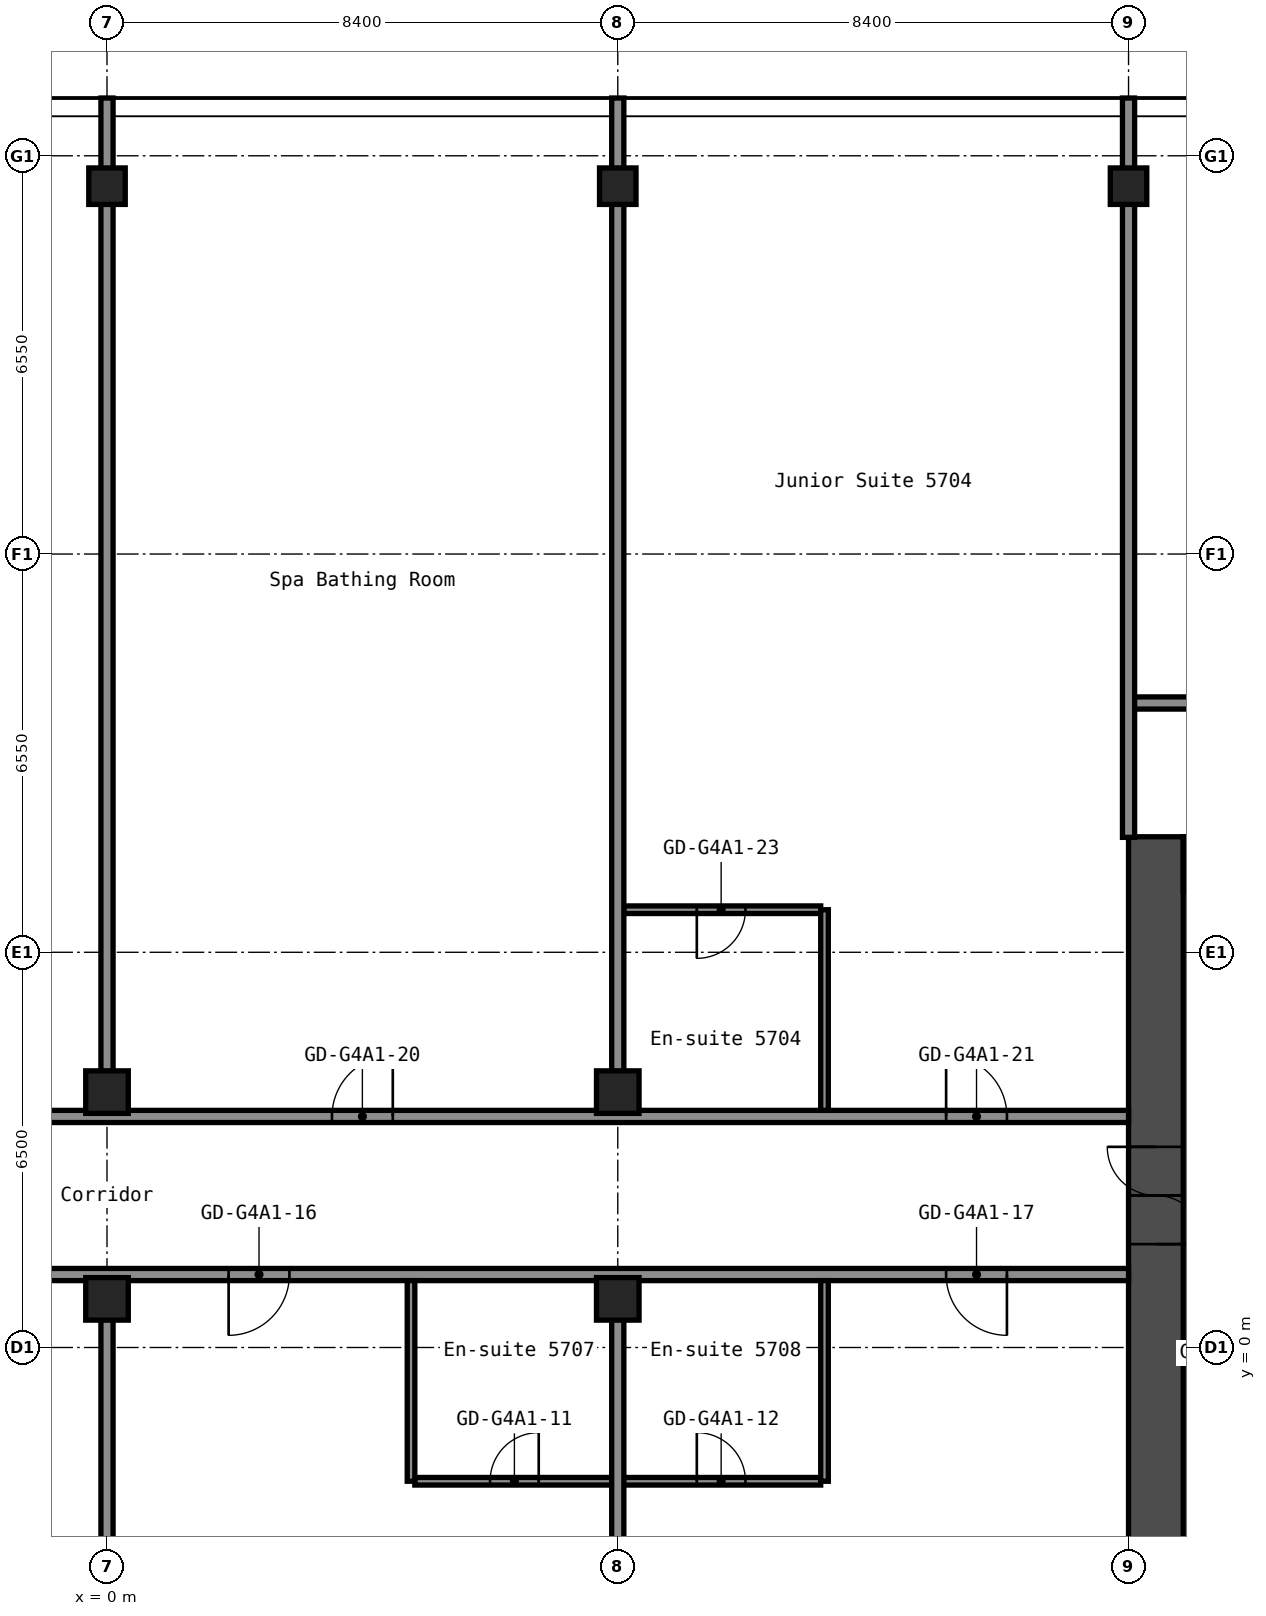
"""IFC4 building model, lengths in metres.
Left out: names, types, materials, properties, quantities, classifications, styles, units other than length and angle.
Written with IfcOpenShell. Run it as: python <this file> out.ifc"""

import sys

from ifc_helpers import new_model, si_unit, direction, frame, frame_2d, origin, origin_2d, place, context, subcontext, project, spatial, rectangle, hollow_rectangle, extrude, element, fill, save


model = new_model("IFC4")
c1 = context("Model", 3, precision=1e-05, world=origin(), true_north=direction((0.0, 1.0)))
c2 = subcontext(c1, "Body", "Model", "MODEL_VIEW")
j1 = project(units=[si_unit("LENGTHUNIT", "METRE"), si_unit("PLANEANGLEUNIT", "RADIAN")], contexts=[c1])
p1 = place(None, origin())
s1 = spatial("IfcSite", under=j1, at=p1, CompositionType="ELEMENT")
p2 = place(p1, origin())
s2 = spatial("IfcBuilding", under=s1, at=p2, CompositionType="ELEMENT")
p3 = place(p2, frame((0.0, 0.0, 202.6)))
s3 = spatial("IfcBuildingStorey", under=s2, at=p3, CompositionType="ELEMENT", Elevation=202.6)
for number, where, z_axis, x_axis in (
    (1, (0.0, 0.8, 0.0), (0.0, 0.0, 1.0), (1.0, 0.0, 0.0)),
    (2, (0.0, 4.2, 0.0), (0.0, 0.0, 1.0), (1.0, 0.0, 0.0)),
):
    element("IfcColumn", number, at=place(p3, frame(where, z_axis=z_axis, x_axis=x_axis)), inside=s3, PredefinedType="COLUMN", context=c2, shape_type="SweptSolid", body=[
        extrude(hollow_rectangle(XDim=0.7, YDim=0.7, WallThickness=0.028, at=origin_2d()), origin(), (0.0, 0.0, 1.0), 2.75),
    ])
p4 = place(p3, frame((0.0, 19.1, 0.0), z_axis=(0.0, 0.0, 1.0), x_axis=(1.0, 0.0, 0.0)))
e3 = element("IfcColumn", 3, at=p4, inside=s3, PredefinedType="COLUMN", context=c2, shape_type="SweptSolid", body=[
    extrude(hollow_rectangle(XDim=0.6, YDim=0.6, WallThickness=0.025, InnerFilletRadius=0.038, OuterFilletRadius=0.062, at=origin_2d()), origin(), (0.0, 0.0, 1.0), 2.75),
])
for number, where, z_axis, x_axis in (
    (4, (8.4, 0.8, 0.0), (0.0, 0.0, 1.0), (1.0, 0.0, 0.0)),
    (5, (8.4, 4.2, 0.0), (0.0, 0.0, 1.0), (1.0, 0.0, 0.0)),
):
    element("IfcColumn", number, at=place(p3, frame(where, z_axis=z_axis, x_axis=x_axis)), inside=s3, PredefinedType="COLUMN", context=c2, shape_type="SweptSolid", body=[
        extrude(hollow_rectangle(XDim=0.7, YDim=0.7, WallThickness=0.028, at=origin_2d()), origin(), (0.0, 0.0, 1.0), 2.75),
    ])
for number, where, z_axis, x_axis in (
    (6, (8.4, 19.1, 0.0), (0.0, 0.0, 1.0), (1.0, 0.0, 0.0)),
    (7, (16.8, 19.1, 0.0), (0.0, 0.0, 1.0), (1.0, 0.0, 0.0)),
):
    element("IfcColumn", number, at=place(p3, frame(where, z_axis=z_axis, x_axis=x_axis)), inside=s3, PredefinedType="COLUMN", context=c2, shape_type="SweptSolid", body=[
        extrude(hollow_rectangle(XDim=0.6, YDim=0.6, WallThickness=0.025, InnerFilletRadius=0.038, OuterFilletRadius=0.062, at=origin_2d()), origin(), (0.0, 0.0, 1.0), 2.75),
    ])
p5 = place(p3, frame((17.25, -8.4, 0.0), z_axis=(0.0, 0.0, 1.0), x_axis=(0.0, 1.0, 0.0)))
e8 = element("IfcWall", 8, at=p5, inside=s3, PredefinedType="SHEAR", context=c2, shape_type="SweptSolid", body=[
    extrude(rectangle(XDim=16.8, YDim=0.9, at=frame_2d((8.4, 0.0))), origin(), (0.0, 0.0, 1.0), 2.75),
])
p6 = place(p5, frame((10.1, 0.0, 0.0)))
e9 = element("IfcOpeningElement", 9, at=p6, cuts=e8, PredefinedType="OPENING", context=c2, shape_type="SweptSolid", body=[
    extrude(rectangle(XDim=1.6, YDim=2.1, at=frame_2d((0.8, 1.05))), frame((0.0, 0.46, 0.0), z_axis=(0.0, -1.0, 0.0), x_axis=(1.0, 0.0, 0.0)), (0.0, 0.0, 1.0), 0.92),
])
p7 = place(p3, frame((17.7, 7.95, 0.0), z_axis=(0.0, 0.0, 1.0), x_axis=(1.0, 0.0, 0.0)))
e10 = element("IfcWall", 10, at=p7, inside=s3, PredefinedType="SHEAR", context=c2, shape_type="SweptSolid", body=[
    extrude(rectangle(XDim=15.0, YDim=0.9, at=frame_2d((7.5, 0.0))), origin(), (0.0, 0.0, 1.0), 2.75),
])
p8 = place(p7, frame((10.4, 0.0, 0.0)))
e11 = element("IfcOpeningElement", 11, at=p8, cuts=e10, PredefinedType="OPENING", context=c2, shape_type="SweptSolid", body=[
    extrude(rectangle(XDim=1.2, YDim=2.1, at=frame_2d((0.6, 1.05))), frame((0.0, 0.46, 0.0), z_axis=(0.0, -1.0, 0.0), x_axis=(1.0, 0.0, 0.0)), (0.0, 0.0, 1.0), 0.92),
])
p9 = place(p7, frame((13.35, 0.0, 0.0)))
e12 = element("IfcOpeningElement", 12, at=p9, cuts=e10, PredefinedType="OPENING", context=c2, shape_type="SweptSolid", body=[
    extrude(rectangle(XDim=0.9, YDim=2.1, at=frame_2d((0.45, 1.05))), frame((0.0, 0.46, 0.0), z_axis=(0.0, -1.0, 0.0), x_axis=(1.0, 0.0, 0.0)), (0.0, 0.0, 1.0), 0.92),
])
p10 = place(p3, frame((5.062, -2.2, 0.0), z_axis=(0.0, 0.0, 1.0), x_axis=(1.0, 0.0, 0.0)))
e13 = element("IfcWall", 13, at=p10, inside=s3, PredefinedType="PARTITIONING", context=c2, shape_type="SweptSolid", body=[
    extrude(rectangle(XDim=6.675, YDim=0.125, at=frame_2d((3.337, 0.0))), origin(), (0.0, 0.0, 1.0), 2.75),
])
p11 = place(p10, frame((1.238, 0.0, 0.0)))
e14 = element("IfcOpeningElement", 14, at=p11, cuts=e13, PredefinedType="OPENING", context=c2, shape_type="SweptSolid", body=[
    extrude(rectangle(XDim=0.8, YDim=2.1, at=frame_2d((0.4, 1.05))), frame((0.0, 0.073, 0.0), z_axis=(0.0, -1.0, 0.0), x_axis=(1.0, 0.0, 0.0)), (0.0, 0.0, 1.0), 0.145),
])
p12 = place(p10, frame((4.637, 0.0, 0.0)))
e15 = element("IfcOpeningElement", 15, at=p12, cuts=e13, PredefinedType="OPENING", context=c2, shape_type="SweptSolid", body=[
    extrude(rectangle(XDim=0.8, YDim=2.1, at=frame_2d((0.4, 1.05))), frame((0.0, 0.073, 0.0), z_axis=(0.0, -1.0, 0.0), x_axis=(1.0, 0.0, 0.0)), (0.0, 0.0, 1.0), 0.145),
])
p13 = place(p3, frame((-16.8, 1.2, 0.0), z_axis=(0.0, 0.0, 1.0), x_axis=(1.0, 0.0, 0.0)))
e16 = element("IfcWall", 16, at=p13, inside=s3, PredefinedType="PARTITIONING", context=c2, shape_type="SweptSolid", body=[
    extrude(rectangle(XDim=33.6, YDim=0.2, at=frame_2d((16.8, 0.0))), origin(), (0.0, 0.0, 1.0), 2.75),
])
p14 = place(p13, frame((2.0, 0.0, 0.0)))
e17 = element("IfcOpeningElement", 17, at=p14, cuts=e16, PredefinedType="OPENING", context=c2, shape_type="SweptSolid", body=[
    extrude(rectangle(XDim=1.0, YDim=2.1, at=frame_2d((0.5, 1.05))), frame((0.0, 0.11, 0.0), z_axis=(0.0, -1.0, 0.0), x_axis=(1.0, 0.0, 0.0)), (0.0, 0.0, 1.0), 0.22),
])
p15 = place(p13, frame((9.8, 0.0, 0.0)))
e18 = element("IfcOpeningElement", 18, at=p15, cuts=e16, PredefinedType="OPENING", context=c2, shape_type="SweptSolid", body=[
    extrude(rectangle(XDim=0.9, YDim=2.1, at=frame_2d((0.45, 1.05))), frame((0.0, 0.11, 0.0), z_axis=(0.0, -1.0, 0.0), x_axis=(1.0, 0.0, 0.0)), (0.0, 0.0, 1.0), 0.22),
])
p16 = place(p13, frame((14.0, 0.0, 0.0)))
e19 = element("IfcOpeningElement", 19, at=p16, cuts=e16, PredefinedType="OPENING", context=c2, shape_type="SweptSolid", body=[
    extrude(rectangle(XDim=0.9, YDim=2.1, at=frame_2d((0.45, 1.05))), frame((0.0, 0.11, 0.0), z_axis=(0.0, -1.0, 0.0), x_axis=(1.0, 0.0, 0.0)), (0.0, 0.0, 1.0), 0.22),
])
p17 = place(p13, frame((18.8, 0.0, 0.0)))
e20 = element("IfcOpeningElement", 20, at=p17, cuts=e16, PredefinedType="OPENING", context=c2, shape_type="SweptSolid", body=[
    extrude(rectangle(XDim=1.0, YDim=2.1, at=frame_2d((0.5, 1.05))), frame((0.0, 0.11, 0.0), z_axis=(0.0, -1.0, 0.0), x_axis=(1.0, 0.0, 0.0)), (0.0, 0.0, 1.0), 0.22),
])
p18 = place(p13, frame((30.6, 0.0, 0.0)))
e21 = element("IfcOpeningElement", 21, at=p18, cuts=e16, PredefinedType="OPENING", context=c2, shape_type="SweptSolid", body=[
    extrude(rectangle(XDim=1.0, YDim=2.1, at=frame_2d((0.5, 1.05))), frame((0.0, 0.11, 0.0), z_axis=(0.0, -1.0, 0.0), x_axis=(1.0, 0.0, 0.0)), (0.0, 0.0, 1.0), 0.22),
])
p19 = place(p3, frame((-16.8, 3.8, 0.0), z_axis=(0.0, 0.0, 1.0), x_axis=(1.0, 0.0, 0.0)))
e22 = element("IfcWall", 22, at=p19, inside=s3, PredefinedType="PARTITIONING", context=c2, shape_type="SweptSolid", body=[
    extrude(rectangle(XDim=33.6, YDim=0.2, at=frame_2d((16.8, 0.0))), origin(), (0.0, 0.0, 1.0), 2.75),
])
p20 = place(p19, frame((5.4, 0.0, 0.0)))
e23 = element("IfcOpeningElement", 23, at=p20, cuts=e22, PredefinedType="OPENING", context=c2, shape_type="SweptSolid", body=[
    extrude(rectangle(XDim=1.0, YDim=2.1, at=frame_2d((0.5, 1.05))), frame((0.0, 0.11, 0.0), z_axis=(0.0, -1.0, 0.0), x_axis=(1.0, 0.0, 0.0)), (0.0, 0.0, 1.0), 0.22),
])
p21 = place(p19, frame((12.1, 0.0, 0.0)))
e24 = element("IfcOpeningElement", 24, at=p21, cuts=e22, PredefinedType="OPENING", context=c2, shape_type="SweptSolid", body=[
    extrude(rectangle(XDim=1.0, YDim=2.1, at=frame_2d((0.5, 1.05))), frame((0.0, 0.11, 0.0), z_axis=(0.0, -1.0, 0.0), x_axis=(1.0, 0.0, 0.0)), (0.0, 0.0, 1.0), 0.22),
])
p22 = place(p19, frame((20.5, 0.0, 0.0)))
e25 = element("IfcOpeningElement", 25, at=p22, cuts=e22, PredefinedType="OPENING", context=c2, shape_type="SweptSolid", body=[
    extrude(rectangle(XDim=1.0, YDim=2.1, at=frame_2d((0.5, 1.05))), frame((0.0, 0.11, 0.0), z_axis=(0.0, -1.0, 0.0), x_axis=(1.0, 0.0, 0.0)), (0.0, 0.0, 1.0), 0.22),
])
p23 = place(p19, frame((30.6, 0.0, 0.0)))
e26 = element("IfcOpeningElement", 26, at=p23, cuts=e22, PredefinedType="OPENING", context=c2, shape_type="SweptSolid", body=[
    extrude(rectangle(XDim=1.0, YDim=2.1, at=frame_2d((0.5, 1.05))), frame((0.0, 0.11, 0.0), z_axis=(0.0, -1.0, 0.0), x_axis=(1.0, 0.0, 0.0)), (0.0, 0.0, 1.0), 0.22),
])
p24 = place(p3, frame((8.5, 7.2, 0.0), z_axis=(0.0, 0.0, 1.0), x_axis=(1.0, 0.0, 0.0)))
e27 = element("IfcWall", 27, at=p24, inside=s3, PredefinedType="PARTITIONING", context=c2, shape_type="SweptSolid", body=[
    extrude(rectangle(XDim=3.238, YDim=0.125, at=frame_2d((1.619, 0.0))), origin(), (0.0, 0.0, 1.0), 2.75),
])
p25 = place(p24, frame((1.2, 0.0, 0.0)))
e28 = element("IfcOpeningElement", 28, at=p25, cuts=e27, PredefinedType="OPENING", context=c2, shape_type="SweptSolid", body=[
    extrude(rectangle(XDim=0.8, YDim=2.1, at=frame_2d((0.4, 1.05))), frame((0.0, 0.073, 0.0), z_axis=(0.0, -1.0, 0.0), x_axis=(1.0, 0.0, 0.0)), (0.0, 0.0, 1.0), 0.145),
])
p26 = place(p3, frame((16.8, 10.6, 0.0), z_axis=(0.0, 0.0, 1.0), x_axis=(1.0, 0.0, 0.0)))
e29 = element("IfcWall", 29, at=p26, inside=s3, PredefinedType="PARTITIONING", context=c2, shape_type="SweptSolid", body=[
    extrude(rectangle(XDim=21.3, YDim=0.2, at=frame_2d((10.65, 0.0))), origin(), (0.0, 0.0, 1.0), 2.75),
])
p27 = place(p26, frame((2.0, 0.0, 0.0)))
e30 = element("IfcOpeningElement", 30, at=p27, cuts=e29, PredefinedType="OPENING", context=c2, shape_type="SweptSolid", body=[
    extrude(rectangle(XDim=1.0, YDim=2.1, at=frame_2d((0.5, 1.05))), frame((0.0, 0.11, 0.0), z_axis=(0.0, -1.0, 0.0), x_axis=(1.0, 0.0, 0.0)), (0.0, 0.0, 1.0), 0.22),
])
p28 = place(p26, frame((10.4, 0.0, 0.0)))
e31 = element("IfcOpeningElement", 31, at=p28, cuts=e29, PredefinedType="OPENING", context=c2, shape_type="SweptSolid", body=[
    extrude(rectangle(XDim=1.0, YDim=2.1, at=frame_2d((0.5, 1.05))), frame((0.0, 0.11, 0.0), z_axis=(0.0, -1.0, 0.0), x_axis=(1.0, 0.0, 0.0)), (0.0, 0.0, 1.0), 0.22),
])
p29 = place(p26, frame((18.45, 0.0, 0.0)))
e32 = element("IfcOpeningElement", 32, at=p29, cuts=e29, PredefinedType="OPENING", context=c2, shape_type="SweptSolid", body=[
    extrude(rectangle(XDim=0.9, YDim=2.1, at=frame_2d((0.45, 1.05))), frame((0.0, 0.11, 0.0), z_axis=(0.0, -1.0, 0.0), x_axis=(1.0, 0.0, 0.0)), (0.0, 0.0, 1.0), 0.22),
])
for number, where, z_axis, x_axis in (
    (33, (0.0, -15.55, 0.0), (0.0, 0.0, 1.0), (0.0, 1.0, 0.0)),
    (34, (0.0, 4.54, 0.0), (0.0, 0.0, 1.0), (0.0, 1.0, 0.0)),
):
    element("IfcWall", number, at=place(p3, frame(where, z_axis=z_axis, x_axis=x_axis)), inside=s3, PredefinedType="PARTITIONING", context=c2, shape_type="SweptSolid", body=[
        extrude(rectangle(XDim=16.01, YDim=0.2, at=frame_2d((8.005, 0.0))), origin(), (0.0, 0.0, 1.0), 2.75),
    ])
p30 = place(p3, frame((5.0, -2.2, 0.0), z_axis=(0.0, 0.0, 1.0), x_axis=(0.0, 1.0, 0.0)))
e35 = element("IfcWall", 35, at=p30, inside=s3, PredefinedType="PARTITIONING", context=c2, shape_type="SweptSolid", body=[
    extrude(rectangle(XDim=3.3, YDim=0.125, at=frame_2d((1.65, 0.0))), origin(), (0.0, 0.0, 1.0), 2.75),
])
for number, where, z_axis, x_axis in (
    (36, (8.4, -15.55, 0.0), (0.0, 0.0, 1.0), (0.0, 1.0, 0.0)),
    (37, (8.4, 4.54, 0.0), (0.0, 0.0, 1.0), (0.0, 1.0, 0.0)),
):
    element("IfcWall", number, at=place(p3, frame(where, z_axis=z_axis, x_axis=x_axis)), inside=s3, PredefinedType="PARTITIONING", context=c2, shape_type="SweptSolid", body=[
        extrude(rectangle(XDim=16.01, YDim=0.2, at=frame_2d((8.005, 0.0))), origin(), (0.0, 0.0, 1.0), 2.75),
    ])
for number, where, z_axis, x_axis in (
    (38, (11.8, -2.2, 0.0), (0.0, 0.0, 1.0), (0.0, 1.0, 0.0)),
    (39, (11.8, 3.9, 0.0), (0.0, 0.0, 1.0), (0.0, 1.0, 0.0)),
):
    element("IfcWall", number, at=place(p3, frame(where, z_axis=z_axis, x_axis=x_axis)), inside=s3, PredefinedType="PARTITIONING", context=c2, shape_type="SweptSolid", body=[
        extrude(rectangle(XDim=3.3, YDim=0.125, at=frame_2d((1.65, 0.0))), origin(), (0.0, 0.0, 1.0), 2.75),
    ])
p31 = place(p3, frame((16.8, 8.39, 0.0), z_axis=(0.0, 0.0, 1.0), x_axis=(0.0, 1.0, 0.0)))
e40 = element("IfcWall", 40, at=p31, inside=s3, PredefinedType="PARTITIONING", context=c2, shape_type="SweptSolid", body=[
    extrude(rectangle(XDim=12.16, YDim=0.2, at=frame_2d((6.08, 0.0))), origin(), (0.0, 0.0, 1.0), 2.75),
])
p32 = place(p6, origin())
e41 = element("IfcDoor", 41, at=p32, inside=s3, OperationType="DOUBLE_DOOR_SINGLE_SWING", PredefinedType="DOOR", context=c2, shape_type="SweptSolid", body=[
    extrude(rectangle(XDim=1.6, YDim=2.1, at=frame_2d((0.8, 1.05))), frame((0.0, 0.025, 0.0), z_axis=(0.0, -1.0, 0.0), x_axis=(1.0, 0.0, 0.0)), (0.0, 0.0, 1.0), 0.05),
])
fill(e9, e41)
p33 = place(p11, origin())
e42 = element("IfcDoor", 42, at=p33, inside=s3, OperationType="SINGLE_SWING_LEFT", PredefinedType="DOOR", context=c2, shape_type="SweptSolid", body=[
    extrude(rectangle(XDim=0.8, YDim=2.1, at=frame_2d((0.4, 1.05))), frame((0.0, 0.025, 0.0), z_axis=(0.0, -1.0, 0.0), x_axis=(1.0, 0.0, 0.0)), (0.0, 0.0, 1.0), 0.05),
])
fill(e14, e42)
p34 = place(p12, origin())
e43 = element("IfcDoor", 43, at=p34, inside=s3, OperationType="SINGLE_SWING_RIGHT", PredefinedType="DOOR", context=c2, shape_type="SweptSolid", body=[
    extrude(rectangle(XDim=0.8, YDim=2.1, at=frame_2d((0.4, 1.05))), frame((0.0, 0.025, 0.0), z_axis=(0.0, -1.0, 0.0), x_axis=(1.0, 0.0, 0.0)), (0.0, 0.0, 1.0), 0.05),
])
fill(e15, e43)
p35 = place(p17, origin())
e44 = element("IfcDoor", 44, at=p35, inside=s3, OperationType="SINGLE_SWING_LEFT", PredefinedType="DOOR", context=c2, shape_type="SweptSolid", body=[
    extrude(rectangle(XDim=1.0, YDim=2.1, at=frame_2d((0.5, 1.05))), frame((0.0, 0.025, 0.0), z_axis=(0.0, -1.0, 0.0), x_axis=(1.0, 0.0, 0.0)), (0.0, 0.0, 1.0), 0.05),
])
fill(e20, e44)
p36 = place(p18, origin())
e45 = element("IfcDoor", 45, at=p36, inside=s3, OperationType="SINGLE_SWING_RIGHT", PredefinedType="DOOR", context=c2, shape_type="SweptSolid", body=[
    extrude(rectangle(XDim=1.0, YDim=2.1, at=frame_2d((0.5, 1.05))), frame((0.0, 0.025, 0.0), z_axis=(0.0, -1.0, 0.0), x_axis=(1.0, 0.0, 0.0)), (0.0, 0.0, 1.0), 0.05),
])
fill(e21, e45)
p37 = place(p22, origin())
e46 = element("IfcDoor", 46, at=p37, inside=s3, OperationType="SINGLE_SWING_LEFT", PredefinedType="DOOR", context=c2, shape_type="SweptSolid", body=[
    extrude(rectangle(XDim=1.0, YDim=2.1, at=frame_2d((0.5, 1.05))), frame((0.0, 0.025, 0.0), z_axis=(0.0, -1.0, 0.0), x_axis=(1.0, 0.0, 0.0)), (0.0, 0.0, 1.0), 0.05),
])
fill(e25, e46)
p38 = place(p23, origin())
e47 = element("IfcDoor", 47, at=p38, inside=s3, OperationType="SINGLE_SWING_RIGHT", PredefinedType="DOOR", context=c2, shape_type="SweptSolid", body=[
    extrude(rectangle(XDim=1.0, YDim=2.1, at=frame_2d((0.5, 1.05))), frame((0.0, 0.025, 0.0), z_axis=(0.0, -1.0, 0.0), x_axis=(1.0, 0.0, 0.0)), (0.0, 0.0, 1.0), 0.05),
])
fill(e26, e47)
p39 = place(p25, origin())
e48 = element("IfcDoor", 48, at=p39, inside=s3, OperationType="SINGLE_SWING_LEFT", PredefinedType="DOOR", context=c2, shape_type="SweptSolid", body=[
    extrude(rectangle(XDim=0.8, YDim=2.1, at=frame_2d((0.4, 1.05))), frame((0.0, 0.025, 0.0), z_axis=(0.0, -1.0, 0.0), x_axis=(1.0, 0.0, 0.0)), (0.0, 0.0, 1.0), 0.05),
])
fill(e28, e48)
save(model, sys.argv[1])
